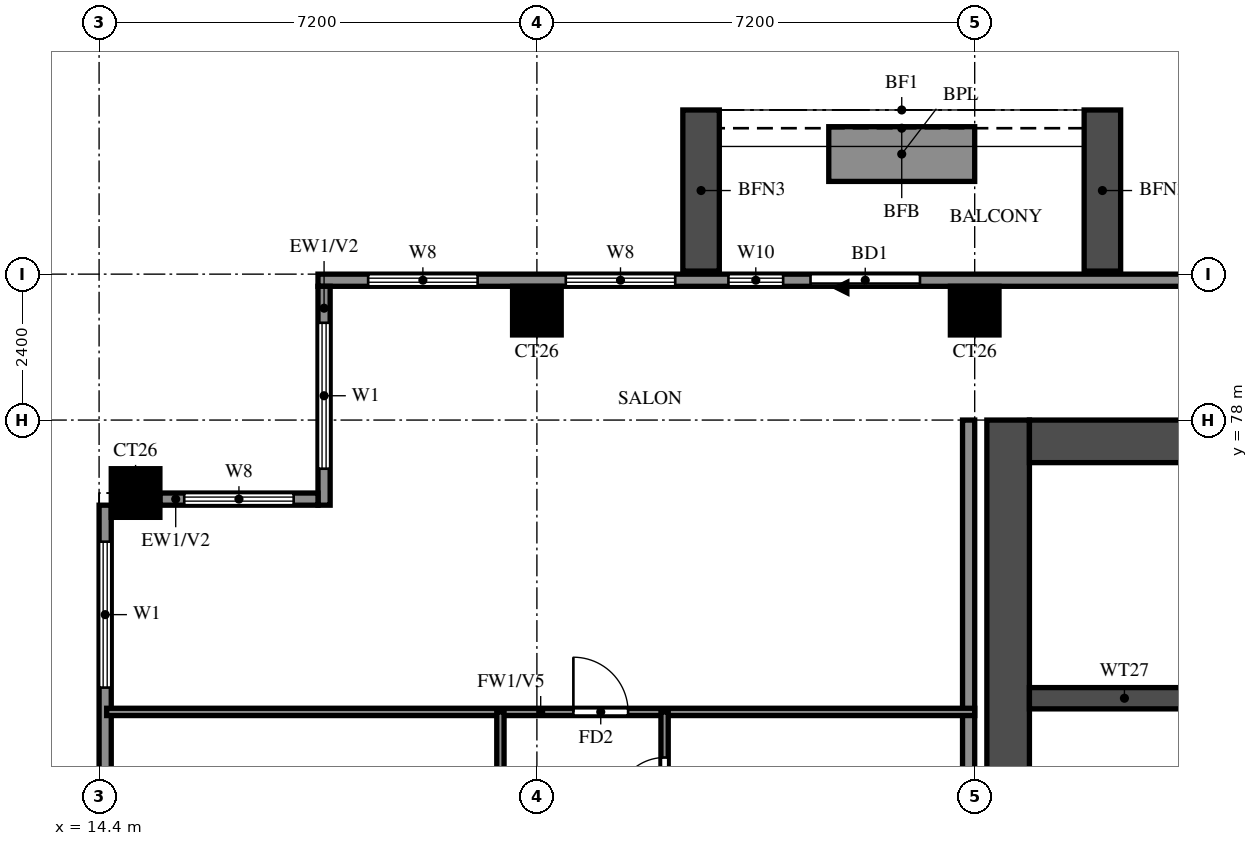
"""IFC4 building model, lengths in metres.
Left out: names, types, materials, properties, quantities, classifications, styles, units other than length and angle.
Written with IfcOpenShell. Run it as: python <this file> out.ifc"""

import sys

from ifc_helpers import new_model, si_unit, direction, frame, frame_2d, origin, origin_2d, place, context, subcontext, project, spatial, rectangle, extrude, source, transform, mapped, element, fill, save


model = new_model("IFC4")
c1 = context("Model", 3, precision=1e-05, world=origin(), true_north=direction((0.0, 1.0)))
c2 = subcontext(c1, "Body", "Model", "MODEL_VIEW")
j1 = project(units=[si_unit("LENGTHUNIT", "METRE"), si_unit("PLANEANGLEUNIT", "RADIAN")], contexts=[c1])
p1 = place(None, origin())
s1 = spatial("IfcSite", under=j1, at=p1, CompositionType="ELEMENT")
p2 = place(p1, origin())
s2 = spatial("IfcBuilding", under=s1, at=p2, CompositionType="ELEMENT")
p3 = place(p2, frame((0.0, 0.0, 181.5)))
s3 = spatial("IfcBuildingStorey", under=s2, at=p3, CompositionType="ELEMENT", Elevation=181.5)
m1 = source(origin(), c2, "Body", "SweptSolid", [
    extrude(rectangle(XDim=0.8, YDim=0.8, at=origin_2d()), origin(), (0.0, 0.0, 1.0), 3.2),
])
for number, where, z_axis, x_axis in (
    (1, (15.0, 76.8, 0.0), (0.0, 0.0, 1.0), (1.0, 0.0, 0.0)),
    (2, (21.6, 79.8, 0.0), (0.0, 0.0, 1.0), (1.0, 0.0, 0.0)),
    (3, (28.8, 79.8, 0.0), (0.0, 0.0, 1.0), (1.0, 0.0, 0.0)),
):
    element("IfcColumn", number, at=place(p3, frame(where, z_axis=z_axis, x_axis=x_axis)), inside=s3, PredefinedType="COLUMN", context=c2, shape_type="MappedRepresentation", body=[
        mapped(m1, transform((0.0, 0.0, 0.0))),
    ])
p4 = place(p3, frame((29.35, 66.1, 0.0), z_axis=(0.0, 0.0, 1.0), x_axis=(0.0, 1.0, 0.0)))
e4 = element("IfcWall", 4, at=p4, inside=s3, PredefinedType="SHEAR", context=c2, shape_type="SweptSolid", body=[
    extrude(rectangle(XDim=11.9, YDim=0.7, at=frame_2d((5.95, 0.0))), origin(), (0.0, 0.0, 1.0), 3.2),
])
p5 = place(p3, frame((29.7, 77.65, 0.0), z_axis=(0.0, 0.0, 1.0), x_axis=(1.0, 0.0, 0.0)))
e5 = element("IfcWall", 5, at=p5, inside=s3, PredefinedType="SHEAR", context=c2, shape_type="SweptSolid", body=[
    extrude(rectangle(XDim=41.4, YDim=0.7, at=frame_2d((20.7, 0.0))), origin(), (0.0, 0.0, 1.0), 3.2),
])
p6 = place(p3, frame((29.7, 73.425, 0.0), z_axis=(0.0, 0.0, 1.0), x_axis=(1.0, 0.0, 0.0)))
e6 = element("IfcWall", 6, at=p6, inside=s3, PredefinedType="SHEAR", context=c2, shape_type="SweptSolid", body=[
    extrude(rectangle(XDim=3.125, YDim=0.35, at=frame_2d((1.562, 0.0))), origin(), (0.0, 0.0, 1.0), 3.2),
])
p7 = place(p3, frame((82.6, 80.3, 0.0), z_axis=(0.0, 0.0, 1.0), x_axis=(-1.0, 0.0, 0.0)))
e7 = element("IfcWall", 7, at=p7, inside=s3, PredefinedType="SOLIDWALL", context=c2, shape_type="SweptSolid", body=[
    extrude(rectangle(XDim=64.6, YDim=0.2, at=frame_2d((32.3, 0.0))), origin(), (0.0, 0.0, 1.0), 3.2),
])
p8 = place(p7, frame((54.7, 0.0, 0.0)))
e8 = element("IfcOpeningElement", 8, at=p8, cuts=e7, PredefinedType="OPENING", context=c2, shape_type="SweptSolid", body=[
    extrude(rectangle(XDim=1.8, YDim=2.4, at=frame_2d((0.9, 1.2))), frame((0.0, 0.11, 0.0), z_axis=(0.0, -1.0, 0.0), x_axis=(1.0, 0.0, 0.0)), (0.0, 0.0, 1.0), 0.22),
])
p9 = place(p7, frame((56.95, 0.0, 0.6)))
e9 = element("IfcOpeningElement", 9, at=p9, cuts=e7, PredefinedType="OPENING", context=c2, shape_type="SweptSolid", body=[
    extrude(rectangle(XDim=0.9, YDim=2.4, at=frame_2d((0.45, 1.2))), frame((0.0, 0.11, 0.0), z_axis=(0.0, -1.0, 0.0), x_axis=(1.0, 0.0, 0.0)), (0.0, 0.0, 1.0), 0.22),
])
p10 = place(p7, frame((58.725, 0.0, 0.6)))
e10 = element("IfcOpeningElement", 10, at=p10, cuts=e7, PredefinedType="OPENING", context=c2, shape_type="SweptSolid", body=[
    extrude(rectangle(XDim=1.8, YDim=2.4, at=frame_2d((0.9, 1.2))), frame((0.0, 0.11, 0.0), z_axis=(0.0, -1.0, 0.0), x_axis=(1.0, 0.0, 0.0)), (0.0, 0.0, 1.0), 0.22),
])
p11 = place(p7, frame((61.975, 0.0, 0.6)))
e11 = element("IfcOpeningElement", 11, at=p11, cuts=e7, PredefinedType="OPENING", context=c2, shape_type="SweptSolid", body=[
    extrude(rectangle(XDim=1.8, YDim=2.4, at=frame_2d((0.9, 1.2))), frame((0.0, 0.11, 0.0), z_axis=(0.0, -1.0, 0.0), x_axis=(1.0, 0.0, 0.0)), (0.0, 0.0, 1.0), 0.22),
])
p12 = place(p7, frame((0.725, 0.0, 0.6)))
e12 = element("IfcOpeningElement", 12, at=p12, cuts=e7, PredefinedType="OPENING", context=c2, shape_type="SweptSolid", body=[
    extrude(rectangle(XDim=1.8, YDim=2.4, at=frame_2d((0.9, 1.2))), frame((0.0, 0.11, 0.0), z_axis=(0.0, -1.0, 0.0), x_axis=(1.0, 0.0, 0.0)), (0.0, 0.0, 1.0), 0.22),
])
p13 = place(p7, frame((4.35, 0.0, 0.6)))
e13 = element("IfcOpeningElement", 13, at=p13, cuts=e7, PredefinedType="OPENING", context=c2, shape_type="SweptSolid", body=[
    extrude(rectangle(XDim=2.4, YDim=2.4, at=frame_2d((1.2, 1.2))), frame((0.0, 0.11, 0.0), z_axis=(0.0, -1.0, 0.0), x_axis=(1.0, 0.0, 0.0)), (0.0, 0.0, 1.0), 0.22),
])
p14 = place(p7, frame((7.25, 0.0, 0.6)))
e14 = element("IfcOpeningElement", 14, at=p14, cuts=e7, PredefinedType="OPENING", context=c2, shape_type="SweptSolid", body=[
    extrude(rectangle(XDim=2.4, YDim=2.4, at=frame_2d((1.2, 1.2))), frame((0.0, 0.11, 0.0), z_axis=(0.0, -1.0, 0.0), x_axis=(1.0, 0.0, 0.0)), (0.0, 0.0, 1.0), 0.22),
])
p15 = place(p3, frame((18.1, 80.2, 0.0), z_axis=(0.0, 0.0, 1.0), x_axis=(0.0, -1.0, 0.0)))
e15 = element("IfcWall", 15, at=p15, inside=s3, PredefinedType="SOLIDWALL", context=c2, shape_type="SweptSolid", body=[
    extrude(rectangle(XDim=3.6, YDim=0.2, at=frame_2d((1.8, 0.0))), origin(), (0.0, 0.0, 1.0), 3.2),
])
p16 = place(p15, frame((0.6, 0.0, 0.6)))
e16 = element("IfcOpeningElement", 16, at=p16, cuts=e15, PredefinedType="OPENING", context=c2, shape_type="SweptSolid", body=[
    extrude(rectangle(XDim=2.4, YDim=2.4, at=frame_2d((1.2, 1.2))), frame((0.0, 0.11, 0.0), z_axis=(0.0, -1.0, 0.0), x_axis=(1.0, 0.0, 0.0)), (0.0, 0.0, 1.0), 0.22),
])
p17 = place(p3, frame((18.0, 76.7, 0.0), z_axis=(0.0, 0.0, 1.0), x_axis=(-1.0, 0.0, 0.0)))
e17 = element("IfcWall", 17, at=p17, inside=s3, PredefinedType="SOLIDWALL", context=c2, shape_type="SweptSolid", body=[
    extrude(rectangle(XDim=2.6, YDim=0.2, at=frame_2d((1.3, 0.0))), origin(), (0.0, 0.0, 1.0), 3.2),
])
p18 = place(p17, frame((0.4, 0.0, 0.6)))
e18 = element("IfcOpeningElement", 18, at=p18, cuts=e17, PredefinedType="OPENING", context=c2, shape_type="SweptSolid", body=[
    extrude(rectangle(XDim=1.8, YDim=2.4, at=frame_2d((0.9, 1.2))), frame((0.0, 0.11, 0.0), z_axis=(0.0, -1.0, 0.0), x_axis=(1.0, 0.0, 0.0)), (0.0, 0.0, 1.0), 0.22),
])
p19 = place(p3, frame((14.5, 76.6, 0.0), z_axis=(0.0, 0.0, 1.0), x_axis=(0.0, -1.0, 0.0)))
e19 = element("IfcWall", 19, at=p19, inside=s3, PredefinedType="SOLIDWALL", context=c2, shape_type="SweptSolid", body=[
    extrude(rectangle(XDim=33.4, YDim=0.2, at=frame_2d((16.7, 0.0))), origin(), (0.0, 0.0, 1.0), 3.2),
])
p20 = place(p19, frame((18.7, 0.0, 0.0)))
e20 = element("IfcOpeningElement", 20, at=p20, cuts=e19, PredefinedType="OPENING", context=c2, shape_type="SweptSolid", body=[
    extrude(rectangle(XDim=1.8, YDim=2.4, at=frame_2d((0.9, 1.2))), frame((0.0, 0.11, 0.0), z_axis=(0.0, -1.0, 0.0), x_axis=(1.0, 0.0, 0.0)), (0.0, 0.0, 1.0), 0.22),
])
p21 = place(p19, frame((29.875, 0.0, 0.6)))
e21 = element("IfcOpeningElement", 21, at=p21, cuts=e19, PredefinedType="OPENING", context=c2, shape_type="SweptSolid", body=[
    extrude(rectangle(XDim=2.4, YDim=2.4, at=frame_2d((1.2, 1.2))), frame((0.0, 0.11, 0.0), z_axis=(0.0, -1.0, 0.0), x_axis=(1.0, 0.0, 0.0)), (0.0, 0.0, 1.0), 0.22),
])
p22 = place(p19, frame((25.425, 0.0, 0.6)))
e22 = element("IfcOpeningElement", 22, at=p22, cuts=e19, PredefinedType="OPENING", context=c2, shape_type="SweptSolid", body=[
    extrude(rectangle(XDim=2.4, YDim=2.4, at=frame_2d((1.2, 1.2))), frame((0.0, 0.11, 0.0), z_axis=(0.0, -1.0, 0.0), x_axis=(1.0, 0.0, 0.0)), (0.0, 0.0, 1.0), 0.22),
])
p23 = place(p19, frame((21.875, 0.0, 0.6)))
e23 = element("IfcOpeningElement", 23, at=p23, cuts=e19, PredefinedType="OPENING", context=c2, shape_type="SweptSolid", body=[
    extrude(rectangle(XDim=1.2, YDim=2.4, at=frame_2d((0.6, 1.2))), frame((0.0, 0.11, 0.0), z_axis=(0.0, -1.0, 0.0), x_axis=(1.0, 0.0, 0.0)), (0.0, 0.0, 1.0), 0.22),
])
p24 = place(p19, frame((23.95, 0.0, 0.6)))
e24 = element("IfcOpeningElement", 24, at=p24, cuts=e19, PredefinedType="OPENING", context=c2, shape_type="SweptSolid", body=[
    extrude(rectangle(XDim=0.9, YDim=2.4, at=frame_2d((0.45, 1.2))), frame((0.0, 0.11, 0.0), z_axis=(0.0, -1.0, 0.0), x_axis=(1.0, 0.0, 0.0)), (0.0, 0.0, 1.0), 0.22),
])
p25 = place(p19, frame((14.675, 0.0, 0.6)))
e25 = element("IfcOpeningElement", 25, at=p25, cuts=e19, PredefinedType="OPENING", context=c2, shape_type="SweptSolid", body=[
    extrude(rectangle(XDim=1.8, YDim=2.4, at=frame_2d((0.9, 1.2))), frame((0.0, 0.11, 0.0), z_axis=(0.0, -1.0, 0.0), x_axis=(1.0, 0.0, 0.0)), (0.0, 0.0, 1.0), 0.22),
])
p26 = place(p19, frame((7.95, 0.0, 0.6)))
e26 = element("IfcOpeningElement", 26, at=p26, cuts=e19, PredefinedType="OPENING", context=c2, shape_type="SweptSolid", body=[
    extrude(rectangle(XDim=2.4, YDim=2.4, at=frame_2d((1.2, 1.2))), frame((0.0, 0.11, 0.0), z_axis=(0.0, -1.0, 0.0), x_axis=(1.0, 0.0, 0.0)), (0.0, 0.0, 1.0), 0.22),
])
p27 = place(p19, frame((10.85, 0.0, 0.6)))
e27 = element("IfcOpeningElement", 27, at=p27, cuts=e19, PredefinedType="OPENING", context=c2, shape_type="SweptSolid", body=[
    extrude(rectangle(XDim=2.4, YDim=2.4, at=frame_2d((1.2, 1.2))), frame((0.0, 0.11, 0.0), z_axis=(0.0, -1.0, 0.0), x_axis=(1.0, 0.0, 0.0)), (0.0, 0.0, 1.0), 0.22),
])
p28 = place(p19, frame((4.575, 0.0, 1.5)))
e28 = element("IfcOpeningElement", 28, at=p28, cuts=e19, PredefinedType="OPENING", context=c2, shape_type="SweptSolid", body=[
    extrude(rectangle(XDim=0.9, YDim=0.9, at=frame_2d((0.45, 0.45))), frame((0.0, 0.11, 0.0), z_axis=(0.0, -1.0, 0.0), x_axis=(1.0, 0.0, 0.0)), (0.0, 0.0, 1.0), 0.22),
])
p29 = place(p19, frame((0.6, 0.0, 0.6)))
e29 = element("IfcOpeningElement", 29, at=p29, cuts=e19, PredefinedType="OPENING", context=c2, shape_type="SweptSolid", body=[
    extrude(rectangle(XDim=2.4, YDim=2.4, at=frame_2d((1.2, 1.2))), frame((0.0, 0.11, 0.0), z_axis=(0.0, -1.0, 0.0), x_axis=(1.0, 0.0, 0.0)), (0.0, 0.0, 1.0), 0.22),
])
for number, where, z_axis, x_axis in (
    (30, (30.9, 80.45, 0.0), (0.0, 0.0, 1.0), (0.0, 1.0, 0.0)),
    (31, (24.3, 80.45, 0.0), (0.0, 0.0, 1.0), (0.0, 1.0, 0.0)),
):
    element("IfcWall", number, at=place(p3, frame(where, z_axis=z_axis, x_axis=x_axis)), inside=s3, PredefinedType="SOLIDWALL", context=c2, shape_type="SweptSolid", body=[
        extrude(rectangle(XDim=2.65, YDim=0.6, at=frame_2d((1.325, 0.0))), origin(), (0.0, 0.0, 1.0), 2.85),
    ])
p30 = place(p3, frame((28.8, 82.375, 0.0), z_axis=(0.0, 0.0, 1.0), x_axis=(-1.0, 0.0, 0.0)))
e32 = element("IfcWall", 32, at=p30, inside=s3, PredefinedType="SOLIDWALL", context=c2, shape_type="SweptSolid", body=[
    extrude(rectangle(XDim=2.4, YDim=0.9, at=frame_2d((1.2, 0.0))), origin(), (0.0, 0.0, 1.0), 0.9),
])
p31 = place(p3, frame((28.7, 62.4, 0.0), z_axis=(0.0, 0.0, 1.0), x_axis=(0.0, 1.0, 0.0)))
e33 = element("IfcWall", 33, at=p31, inside=s3, PredefinedType="SOLIDWALL", context=c2, shape_type="SweptSolid", body=[
    extrude(rectangle(XDim=15.6, YDim=0.2, at=frame_2d((7.8, 0.0))), origin(), (0.0, 0.0, 1.0), 3.2),
])
p32 = place(p3, frame((14.525, 73.2, 0.0), z_axis=(0.0, 0.0, 1.0), x_axis=(1.0, 0.0, 0.0)))
e34 = element("IfcWall", 34, at=p32, inside=s3, PredefinedType="PARTITIONING", context=c2, shape_type="SweptSolid", body=[
    extrude(rectangle(XDim=14.275, YDim=0.12, at=frame_2d((7.138, 0.0))), origin(), (0.0, 0.0, 1.0), 2.3),
])
p33 = place(p32, frame((7.675, 0.0, 0.0)))
e35 = element("IfcOpeningElement", 35, at=p33, cuts=e34, PredefinedType="OPENING", context=c2, shape_type="SweptSolid", body=[
    extrude(rectangle(XDim=0.9, YDim=2.1, at=frame_2d((0.45, 1.05))), frame((0.0, 0.07, 0.0), z_axis=(0.0, -1.0, 0.0), x_axis=(1.0, 0.0, 0.0)), (0.0, 0.0, 1.0), 0.14),
])
p34 = place(p3, frame((21.0, 69.6, 0.0), z_axis=(0.0, 0.0, 1.0), x_axis=(0.0, 1.0, 0.0)))
e36 = element("IfcWall", 36, at=p34, inside=s3, PredefinedType="PARTITIONING", context=c2, shape_type="SweptSolid", body=[
    extrude(rectangle(XDim=3.6, YDim=0.12, at=frame_2d((1.8, 0.0))), origin(), (0.0, 0.0, 1.0), 3.2),
])
p35 = place(p3, frame((23.7, 61.2, 0.0), z_axis=(0.0, 0.0, 1.0), x_axis=(0.0, 1.0, 0.0)))
e37 = element("IfcWall", 37, at=p35, inside=s3, PredefinedType="PARTITIONING", context=c2, shape_type="SweptSolid", body=[
    extrude(rectangle(XDim=12.0, YDim=0.12, at=frame_2d((6.0, 0.0))), origin(), (0.0, 0.0, 1.0), 3.2),
])
p36 = place(p35, frame((4.2, 0.0, 0.0)))
e38 = element("IfcOpeningElement", 38, at=p36, cuts=e37, PredefinedType="OPENING", context=c2, shape_type="SweptSolid", body=[
    extrude(rectangle(XDim=0.9, YDim=2.1, at=frame_2d((0.45, 1.05))), frame((0.0, 0.07, 0.0), z_axis=(0.0, -1.0, 0.0), x_axis=(1.0, 0.0, 0.0)), (0.0, 0.0, 1.0), 0.14),
])
p37 = place(p35, frame((7.975, 0.0, 0.0)))
e39 = element("IfcOpeningElement", 39, at=p37, cuts=e37, PredefinedType="OPENING", context=c2, shape_type="SweptSolid", body=[
    extrude(rectangle(XDim=0.8, YDim=2.1, at=frame_2d((0.4, 1.05))), frame((0.0, 0.07, 0.0), z_axis=(0.0, -1.0, 0.0), x_axis=(1.0, 0.0, 0.0)), (0.0, 0.0, 1.0), 0.14),
])
p38 = place(p35, frame((10.45, 0.0, 0.0)))
e40 = element("IfcOpeningElement", 40, at=p38, cuts=e37, PredefinedType="OPENING", context=c2, shape_type="SweptSolid", body=[
    extrude(rectangle(XDim=0.8, YDim=2.1, at=frame_2d((0.4, 1.05))), frame((0.0, 0.07, 0.0), z_axis=(0.0, -1.0, 0.0), x_axis=(1.0, 0.0, 0.0)), (0.0, 0.0, 1.0), 0.14),
])
p39 = place(p8, origin())
e41 = element("IfcDoor", 41, at=p39, inside=s3, OperationType="DOUBLE_DOOR_SLIDING", PredefinedType="DOOR", context=c2, shape_type="SweptSolid", body=[
    extrude(rectangle(XDim=1.8, YDim=2.4, at=frame_2d((0.9, 1.2))), frame((0.0, 0.025, 0.0), z_axis=(0.0, -1.0, 0.0), x_axis=(1.0, 0.0, 0.0)), (0.0, 0.0, 1.0), 0.05),
])
fill(e8, e41)
p40 = place(p9, origin())
e42 = element("IfcWindow", 42, at=p40, inside=s3, PartitioningType="SINGLE_PANEL", PredefinedType="WINDOW", context=c2, shape_type="SweptSolid", body=[
    extrude(rectangle(XDim=0.9, YDim=2.4, at=frame_2d((0.45, 1.2))), frame((0.0, 0.03, 0.0), z_axis=(0.0, -1.0, 0.0), x_axis=(1.0, 0.0, 0.0)), (0.0, 0.0, 1.0), 0.06),
])
fill(e9, e42)
p41 = place(p10, origin())
e43 = element("IfcWindow", 43, at=p41, inside=s3, PartitioningType="DOUBLE_PANEL_VERTICAL", PredefinedType="WINDOW", context=c2, shape_type="SweptSolid", body=[
    extrude(rectangle(XDim=1.8, YDim=2.4, at=frame_2d((0.9, 1.2))), frame((0.0, 0.03, 0.0), z_axis=(0.0, -1.0, 0.0), x_axis=(1.0, 0.0, 0.0)), (0.0, 0.0, 1.0), 0.06),
])
fill(e10, e43)
p42 = place(p11, origin())
e44 = element("IfcWindow", 44, at=p42, inside=s3, PartitioningType="DOUBLE_PANEL_VERTICAL", PredefinedType="WINDOW", context=c2, shape_type="SweptSolid", body=[
    extrude(rectangle(XDim=1.8, YDim=2.4, at=frame_2d((0.9, 1.2))), frame((0.0, 0.03, 0.0), z_axis=(0.0, -1.0, 0.0), x_axis=(1.0, 0.0, 0.0)), (0.0, 0.0, 1.0), 0.06),
])
fill(e11, e44)
p43 = place(p16, origin())
e45 = element("IfcWindow", 45, at=p43, inside=s3, PartitioningType="DOUBLE_PANEL_VERTICAL", PredefinedType="WINDOW", context=c2, shape_type="SweptSolid", body=[
    extrude(rectangle(XDim=2.4, YDim=2.4, at=frame_2d((1.2, 1.2))), frame((0.0, 0.03, 0.0), z_axis=(0.0, -1.0, 0.0), x_axis=(1.0, 0.0, 0.0)), (0.0, 0.0, 1.0), 0.06),
])
fill(e16, e45)
p44 = place(p18, origin())
e46 = element("IfcWindow", 46, at=p44, inside=s3, PartitioningType="DOUBLE_PANEL_VERTICAL", PredefinedType="WINDOW", context=c2, shape_type="SweptSolid", body=[
    extrude(rectangle(XDim=1.8, YDim=2.4, at=frame_2d((0.9, 1.2))), frame((0.0, 0.03, 0.0), z_axis=(0.0, -1.0, 0.0), x_axis=(1.0, 0.0, 0.0)), (0.0, 0.0, 1.0), 0.06),
])
fill(e18, e46)
p45 = place(p29, origin())
e47 = element("IfcWindow", 47, at=p45, inside=s3, PartitioningType="DOUBLE_PANEL_VERTICAL", PredefinedType="WINDOW", context=c2, shape_type="SweptSolid", body=[
    extrude(rectangle(XDim=2.4, YDim=2.4, at=frame_2d((1.2, 1.2))), frame((0.0, 0.03, 0.0), z_axis=(0.0, -1.0, 0.0), x_axis=(1.0, 0.0, 0.0)), (0.0, 0.0, 1.0), 0.06),
])
fill(e29, e47)
p46 = place(p33, origin())
e48 = element("IfcDoor", 48, at=p46, inside=s3, OperationType="SINGLE_SWING_RIGHT", PredefinedType="DOOR", context=c2, shape_type="SweptSolid", body=[
    extrude(rectangle(XDim=0.9, YDim=2.1, at=frame_2d((0.45, 1.05))), frame((0.0, 0.025, 0.0), z_axis=(0.0, -1.0, 0.0), x_axis=(1.0, 0.0, 0.0)), (0.0, 0.0, 1.0), 0.05),
])
fill(e35, e48)
p47 = place(p38, origin())
e49 = element("IfcDoor", 49, at=p47, inside=s3, OperationType="SINGLE_SWING_LEFT", PredefinedType="DOOR", context=c2, shape_type="SweptSolid", body=[
    extrude(rectangle(XDim=0.8, YDim=2.1, at=frame_2d((0.4, 1.05))), frame((0.0, 0.025, 0.0), z_axis=(0.0, -1.0, 0.0), x_axis=(1.0, 0.0, 0.0)), (0.0, 0.0, 1.0), 0.05),
])
fill(e40, e49)
save(model, sys.argv[1])
